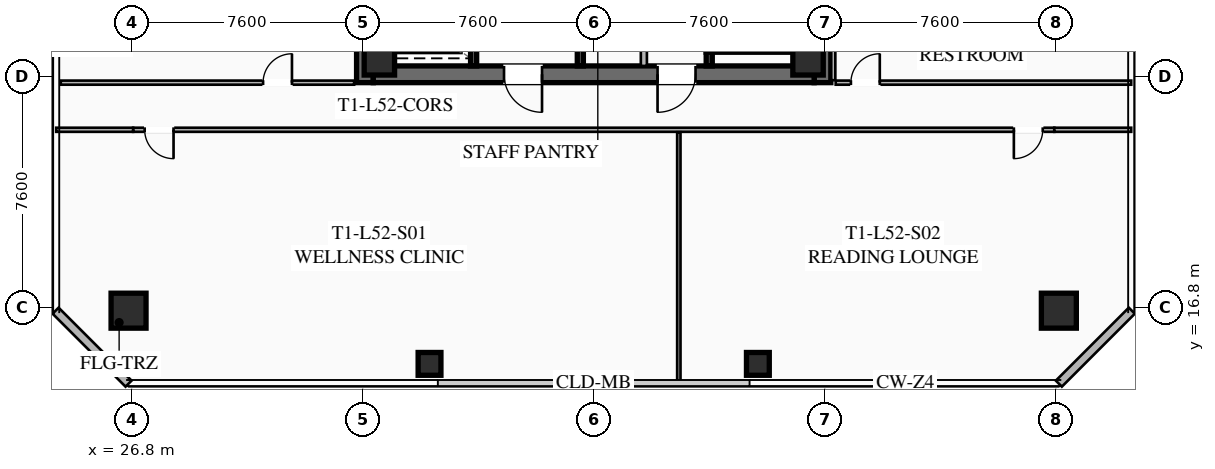
"""IFC4 building model, lengths in metres.
Left out: names, types, materials, properties, quantities, classifications, styles, units other than length and angle.
Written with IfcOpenShell. Run it as: python <this file> out.ifc"""

import sys

from ifc_helpers import new_model, si_unit, direction, frame, frame_2d, origin, origin_2d, place, context, subcontext, project, spatial, rectangle, hollow_rectangle, extrude, element, fill, save


model = new_model("IFC4")
c1 = context("Model", 3, precision=1e-05, world=origin(), true_north=direction((0.0, 1.0)))
c2 = subcontext(c1, "Body", "Model", "MODEL_VIEW")
j1 = project(units=[si_unit("LENGTHUNIT", "METRE"), si_unit("PLANEANGLEUNIT", "RADIAN")], contexts=[c1])
p1 = place(None, origin())
s1 = spatial("IfcSite", under=j1, at=p1, CompositionType="ELEMENT")
p2 = place(p1, origin())
s2 = spatial("IfcBuilding", under=s1, at=p2, CompositionType="ELEMENT")
p3 = place(p2, frame((0.0, 0.0, 192.5)))
s3 = spatial("IfcBuildingStorey", under=s2, at=p3, CompositionType="ELEMENT", Elevation=192.5)
for number, where, z_axis, x_axis in (
    (1, (34.475, 24.2, 0.0), (0.0, 0.0, 1.0), (0.0, 1.0, 0.0)),
    (2, (49.525, 39.8, 0.0), (0.0, 0.0, 1.0), (0.0, -1.0, 0.0)),
):
    element("IfcWall", number, at=place(p3, frame(where, z_axis=z_axis, x_axis=x_axis)), inside=s3, PredefinedType="SHEAR", context=c2, shape_type="SweptSolid", body=[
        extrude(rectangle(XDim=15.6, YDim=0.55, at=frame_2d((7.8, 0.0))), origin(), (0.0, 0.0, 1.0), 3.55),
    ])
p4 = place(p3, frame((49.25, 24.475, 0.0), z_axis=(0.0, 0.0, 1.0), x_axis=(-1.0, 0.0, 0.0)))
e3 = element("IfcWall", 3, at=p4, inside=s3, PredefinedType="SHEAR", context=c2, shape_type="SweptSolid", body=[
    extrude(rectangle(XDim=14.5, YDim=0.55, at=frame_2d((7.25, 0.0))), origin(), (0.0, 0.0, 1.0), 3.55),
])
p5 = place(p4, frame((8.95, 0.0, 0.0)))
e4 = element("IfcOpeningElement", 4, at=p5, cuts=e3, PredefinedType="OPENING", context=c2, shape_type="SweptSolid", body=[
    extrude(rectangle(XDim=1.25, YDim=2.25, at=frame_2d((0.625, 1.125))), frame((0.0, 0.285, 0.0), z_axis=(0.0, -1.0, 0.0), x_axis=(1.0, 0.0, 0.0)), (0.0, 0.0, 1.0), 0.57),
])
p6 = place(p4, frame((3.9, 0.0, 0.0)))
e5 = element("IfcOpeningElement", 5, at=p6, cuts=e3, PredefinedType="OPENING", context=c2, shape_type="SweptSolid", body=[
    extrude(rectangle(XDim=1.25, YDim=2.25, at=frame_2d((0.625, 1.125))), frame((0.0, 0.285, 0.0), z_axis=(0.0, -1.0, 0.0), x_axis=(1.0, 0.0, 0.0)), (0.0, 0.0, 1.0), 0.57),
])
for number, where, z_axis, x_axis in (
    (6, (34.95, 24.95, 0.0), (0.0, 0.0, 1.0), (1.0, 0.0, 0.0)),
    (7, (49.05, 24.95, 0.0), (0.0, 0.0, 1.0), (1.0, 0.0, 0.0)),
):
    element("IfcColumn", number, at=place(p3, frame(where, z_axis=z_axis, x_axis=x_axis)), inside=s3, PredefinedType="COLUMN", context=c2, shape_type="SweptSolid", body=[
        extrude(hollow_rectangle(XDim=1.0, YDim=1.0, WallThickness=0.04, at=origin_2d()), origin(), (0.0, 0.0, 1.0), 3.37),
    ])
for number, where, z_axis, x_axis in (
    (8, (26.7, 16.7, 0.0), (0.0, 0.0, 1.0), (1.0, 0.0, 0.0)),
    (9, (57.3, 16.7, 0.0), (0.0, 0.0, 1.0), (1.0, 0.0, 0.0)),
):
    element("IfcColumn", number, at=place(p3, frame(where, z_axis=z_axis, x_axis=x_axis)), inside=s3, PredefinedType="COLUMN", context=c2, shape_type="SweptSolid", body=[
        extrude(hollow_rectangle(XDim=1.15, YDim=1.15, WallThickness=0.045, at=origin_2d()), origin(), (0.0, 0.0, 1.0), 3.37),
    ])
for number, where, z_axis, x_axis in (
    (10, (36.6, 14.95, 0.0), (0.0, 0.0, 1.0), (1.0, 0.0, 0.0)),
    (11, (47.4, 14.95, 0.0), (0.0, 0.0, 1.0), (1.0, 0.0, 0.0)),
):
    element("IfcColumn", number, at=place(p3, frame(where, z_axis=z_axis, x_axis=x_axis)), inside=s3, PredefinedType="COLUMN", context=c2, shape_type="SweptSolid", body=[
        extrude(hollow_rectangle(XDim=0.75, YDim=0.75, WallThickness=0.032, at=origin_2d()), origin(), (0.0, 0.0, 1.0), 3.37),
    ])
for number, where, z_axis, x_axis in (
    (12, (26.7, 14.3, 0.0), (0.0, 0.0, 1.0), (-0.707, 0.707, 0.0)),
    (13, (59.7, 16.7, 0.0), (0.0, 0.0, 1.0), (-0.707, -0.707, 0.0)),
):
    element("IfcWall", number, at=place(p3, frame(where, z_axis=z_axis, x_axis=x_axis)), inside=s3, PredefinedType="SOLIDWALL", context=c2, shape_type="SweptSolid", body=[
        extrude(rectangle(XDim=3.394, YDim=0.28, at=frame_2d((1.697, 0.0))), origin(), (0.0, 0.0, 1.0), 3.37),
    ])
p7 = place(p3, frame((45.8, 32.8, 0.0), z_axis=(0.0, 0.0, 1.0), x_axis=(0.0, -1.0, 0.0)))
e14 = element("IfcWall", 14, at=p7, inside=s3, PredefinedType="SHEAR", context=c2, shape_type="SweptSolid", body=[
    extrude(rectangle(XDim=8.05, YDim=0.2, at=frame_2d((4.025, 0.0))), origin(), (0.0, 0.0, 1.0), 3.37),
])
p8 = place(p7, frame((0.45, 0.0, 0.0)))
e15 = element("IfcOpeningElement", 15, at=p8, cuts=e14, PredefinedType="OPENING", context=c2, shape_type="SweptSolid", body=[
    extrude(rectangle(XDim=1.15, YDim=2.2, at=frame_2d((0.575, 1.1))), frame((0.0, 0.11, 0.0), z_axis=(0.0, -1.0, 0.0), x_axis=(1.0, 0.0, 0.0)), (0.0, 0.0, 1.0), 0.22),
])
p9 = place(p3, frame((41.56, 24.75, 0.0), z_axis=(0.0, 0.0, 1.0), x_axis=(0.0, 1.0, 0.0)))
e16 = element("IfcWall", 16, at=p9, inside=s3, PredefinedType="SHEAR", context=c2, shape_type="SweptSolid", body=[
    extrude(rectangle(XDim=14.5, YDim=0.2, at=frame_2d((7.25, 0.0))), origin(), (0.0, 0.0, 1.0), 3.37),
])
p10 = place(p3, frame((38.05, 24.75, 0.0), z_axis=(0.0, 0.0, 1.0), x_axis=(0.0, 1.0, 0.0)))
e17 = element("IfcWall", 17, at=p10, inside=s3, PredefinedType="SHEAR", context=c2, shape_type="SweptSolid", body=[
    extrude(rectangle(XDim=6.45, YDim=0.2, at=frame_2d((3.225, 0.0))), origin(), (0.0, 0.0, 1.0), 3.37),
])
p11 = place(p10, frame((4.875, 0.0, 0.0)))
e18 = element("IfcOpeningElement", 18, at=p11, cuts=e17, PredefinedType="OPENING", context=c2, shape_type="SweptSolid", body=[
    extrude(rectangle(XDim=1.3, YDim=2.25, at=frame_2d((0.65, 1.125))), frame((0.0, 0.11, 0.0), z_axis=(0.0, -1.0, 0.0), x_axis=(1.0, 0.0, 0.0)), (0.0, 0.0, 1.0), 0.22),
])
p12 = place(p10, frame((2.875, 0.0, 0.0)))
e19 = element("IfcOpeningElement", 19, at=p12, cuts=e17, PredefinedType="OPENING", context=c2, shape_type="SweptSolid", body=[
    extrude(rectangle(XDim=1.3, YDim=2.25, at=frame_2d((0.65, 1.125))), frame((0.0, 0.11, 0.0), z_axis=(0.0, -1.0, 0.0), x_axis=(1.0, 0.0, 0.0)), (0.0, 0.0, 1.0), 0.22),
])
p13 = place(p10, frame((0.675, 0.0, 0.0)))
e20 = element("IfcOpeningElement", 20, at=p13, cuts=e17, PredefinedType="OPENING", context=c2, shape_type="SweptSolid", body=[
    extrude(rectangle(XDim=1.3, YDim=2.25, at=frame_2d((0.65, 1.125))), frame((0.0, 0.11, 0.0), z_axis=(0.0, -1.0, 0.0), x_axis=(1.0, 0.0, 0.0)), (0.0, 0.0, 1.0), 0.22),
])
p14 = place(p3, frame((43.65, 24.75, 0.0), z_axis=(0.0, 0.0, 1.0), x_axis=(0.0, 1.0, 0.0)))
e21 = element("IfcWall", 21, at=p14, inside=s3, PredefinedType="SOLIDWALL", context=c2, shape_type="SweptSolid", body=[
    extrude(rectangle(XDim=6.9, YDim=0.2, at=frame_2d((3.45, 0.0))), origin(), (0.0, 0.0, 1.0), 2.723),
])
p15 = place(p14, frame((0.85, 0.0, 0.0)))
e22 = element("IfcOpeningElement", 22, at=p15, cuts=e21, PredefinedType="OPENING", context=c2, shape_type="SweptSolid", body=[
    extrude(rectangle(XDim=0.95, YDim=2.05, at=frame_2d((0.475, 1.025))), frame((0.0, 0.11, 0.0), z_axis=(0.0, -1.0, 0.0), x_axis=(1.0, 0.0, 0.0)), (0.0, 0.0, 1.0), 0.22),
])
p16 = place(p14, frame((4.8, 0.0, 0.0)))
e23 = element("IfcOpeningElement", 23, at=p16, cuts=e21, PredefinedType="OPENING", context=c2, shape_type="SweptSolid", body=[
    extrude(rectangle(XDim=1.05, YDim=2.2, at=frame_2d((0.525, 1.1))), frame((0.0, 0.11, 0.0), z_axis=(0.0, -1.0, 0.0), x_axis=(1.0, 0.0, 0.0)), (0.0, 0.0, 1.0), 0.22),
])
p17 = place(p3, frame((57.15, 22.65, 0.0), z_axis=(0.0, 0.0, 1.0), x_axis=(-1.0, 0.0, 0.0)))
e24 = element("IfcWall", 24, at=p17, inside=s3, PredefinedType="PARTITIONING", context=c2, shape_type="SweptSolid", body=[
    extrude(rectangle(XDim=30.3, YDim=0.135, at=frame_2d((15.15, 0.0))), origin(), (0.0, 0.0, 1.0), 2.723),
])
p18 = place(p17, frame((28.97, 0.0, 0.0)))
e25 = element("IfcOpeningElement", 25, at=p18, cuts=e24, PredefinedType="OPENING", context=c2, shape_type="SweptSolid", body=[
    extrude(rectangle(XDim=0.95, YDim=2.05, at=frame_2d((0.475, 1.025))), frame((0.0, 0.077, 0.0), z_axis=(0.0, -1.0, 0.0), x_axis=(1.0, 0.0, 0.0)), (0.0, 0.0, 1.0), 0.155),
])
p19 = place(p17, frame((0.38, 0.0, 0.0)))
e26 = element("IfcOpeningElement", 26, at=p19, cuts=e24, PredefinedType="OPENING", context=c2, shape_type="SweptSolid", body=[
    extrude(rectangle(XDim=0.95, YDim=2.05, at=frame_2d((0.475, 1.025))), frame((0.0, 0.077, 0.0), z_axis=(0.0, -1.0, 0.0), x_axis=(1.0, 0.0, 0.0)), (0.0, 0.0, 1.0), 0.155),
])
for number, where, z_axis, x_axis in (
    (27, (24.32, 22.65, 0.0), (0.0, 0.0, 1.0), (1.0, 0.0, 0.0)),
    (28, (57.15, 22.65, 0.0), (0.0, 0.0, 1.0), (1.0, 0.0, 0.0)),
):
    element("IfcWall", number, at=place(p3, frame(where, z_axis=z_axis, x_axis=x_axis)), inside=s3, PredefinedType="PARTITIONING", context=c2, shape_type="SweptSolid", body=[
        extrude(rectangle(XDim=2.53, YDim=0.135, at=frame_2d((1.265, 0.0))), origin(), (0.0, 0.0, 1.0), 2.723),
    ])
p20 = place(p3, frame((44.8, 14.32, 0.0), z_axis=(0.0, 0.0, 1.0), x_axis=(0.0, 1.0, 0.0)))
e29 = element("IfcWall", 29, at=p20, inside=s3, PredefinedType="PARTITIONING", context=c2, shape_type="SweptSolid", body=[
    extrude(rectangle(XDim=8.25, YDim=0.11, at=frame_2d((4.125, 0.0))), origin(), (0.0, 0.0, 1.0), 2.723),
])
p21 = place(p3, frame((49.88, 39.72, 0.0), z_axis=(0.0, 0.0, 1.0), x_axis=(0.0, -1.0, 0.0)))
e30 = element("IfcWall", 30, at=p21, inside=s3, PredefinedType="PARTITIONING", context=c2, shape_type="SweptSolid", body=[
    extrude(rectangle(XDim=15.44, YDim=0.135, at=frame_2d((7.72, 0.0))), origin(), (0.0, 0.0, 1.0), 2.723),
])
p22 = place(p3, frame((49.96, 24.2, 0.0), z_axis=(0.0, 0.0, 1.0), x_axis=(1.0, 0.0, 0.0)))
e31 = element("IfcWall", 31, at=p22, inside=s3, PredefinedType="PARTITIONING", context=c2, shape_type="SweptSolid", body=[
    extrude(rectangle(XDim=9.72, YDim=0.135, at=frame_2d((4.86, 0.0))), origin(), (0.0, 0.0, 1.0), 2.723),
])
p23 = place(p22, frame((0.5, 0.0, 0.0)))
e32 = element("IfcOpeningElement", 32, at=p23, cuts=e31, PredefinedType="OPENING", context=c2, shape_type="SweptSolid", body=[
    extrude(rectangle(XDim=0.95, YDim=2.05, at=frame_2d((0.475, 1.025))), frame((0.0, 0.077, 0.0), z_axis=(0.0, -1.0, 0.0), x_axis=(1.0, 0.0, 0.0)), (0.0, 0.0, 1.0), 0.155),
])
p24 = place(p3, frame((24.47, 24.2, 0.0), z_axis=(0.0, 0.0, 1.0), x_axis=(1.0, 0.0, 0.0)))
e33 = element("IfcWall", 33, at=p24, inside=s3, PredefinedType="PARTITIONING", context=c2, shape_type="SweptSolid", body=[
    extrude(rectangle(XDim=9.65, YDim=0.135, at=frame_2d((4.825, 0.0))), origin(), (0.0, 0.0, 1.0), 2.723),
])
p25 = place(p24, frame((6.655, 0.0, 0.0)))
e34 = element("IfcOpeningElement", 34, at=p25, cuts=e33, PredefinedType="OPENING", context=c2, shape_type="SweptSolid", body=[
    extrude(rectangle(XDim=0.95, YDim=2.05, at=frame_2d((0.475, 1.025))), frame((0.0, 0.077, 0.0), z_axis=(0.0, -1.0, 0.0), x_axis=(1.0, 0.0, 0.0)), (0.0, 0.0, 1.0), 0.155),
])
p26 = place(p5, origin())
e35 = element("IfcDoor", 35, at=p26, inside=s3, OperationType="SINGLE_SWING_LEFT", PredefinedType="DOOR", context=c2, shape_type="SweptSolid", body=[
    extrude(rectangle(XDim=1.25, YDim=2.25, at=frame_2d((0.625, 1.125))), frame((0.0, 0.025, 0.0), z_axis=(0.0, -1.0, 0.0), x_axis=(1.0, 0.0, 0.0)), (0.0, 0.0, 1.0), 0.05),
])
fill(e4, e35)
p27 = place(p6, origin())
e36 = element("IfcDoor", 36, at=p27, inside=s3, OperationType="SINGLE_SWING_RIGHT", PredefinedType="DOOR", context=c2, shape_type="SweptSolid", body=[
    extrude(rectangle(XDim=1.25, YDim=2.25, at=frame_2d((0.625, 1.125))), frame((0.0, 0.025, 0.0), z_axis=(0.0, -1.0, 0.0), x_axis=(1.0, 0.0, 0.0)), (0.0, 0.0, 1.0), 0.05),
])
fill(e5, e36)
p28 = place(p18, origin())
e37 = element("IfcDoor", 37, at=p28, inside=s3, OperationType="SINGLE_SWING_LEFT", PredefinedType="DOOR", context=c2, shape_type="SweptSolid", body=[
    extrude(rectangle(XDim=0.95, YDim=2.05, at=frame_2d((0.475, 1.025))), frame((0.0, 0.025, 0.0), z_axis=(0.0, -1.0, 0.0), x_axis=(1.0, 0.0, 0.0)), (0.0, 0.0, 1.0), 0.05),
])
fill(e25, e37)
p29 = place(p19, origin())
e38 = element("IfcDoor", 38, at=p29, inside=s3, OperationType="SINGLE_SWING_RIGHT", PredefinedType="DOOR", context=c2, shape_type="SweptSolid", body=[
    extrude(rectangle(XDim=0.95, YDim=2.05, at=frame_2d((0.475, 1.025))), frame((0.0, 0.025, 0.0), z_axis=(0.0, -1.0, 0.0), x_axis=(1.0, 0.0, 0.0)), (0.0, 0.0, 1.0), 0.05),
])
fill(e26, e38)
p30 = place(p23, origin())
e39 = element("IfcDoor", 39, at=p30, inside=s3, OperationType="SINGLE_SWING_RIGHT", PredefinedType="DOOR", context=c2, shape_type="SweptSolid", body=[
    extrude(rectangle(XDim=0.95, YDim=2.05, at=frame_2d((0.475, 1.025))), frame((0.0, 0.025, 0.0), z_axis=(0.0, -1.0, 0.0), x_axis=(1.0, 0.0, 0.0)), (0.0, 0.0, 1.0), 0.05),
])
fill(e32, e39)
p31 = place(p25, origin())
e40 = element("IfcDoor", 40, at=p31, inside=s3, OperationType="SINGLE_SWING_RIGHT", PredefinedType="DOOR", context=c2, shape_type="SweptSolid", body=[
    extrude(rectangle(XDim=0.95, YDim=2.05, at=frame_2d((0.475, 1.025))), frame((0.0, 0.025, 0.0), z_axis=(0.0, -1.0, 0.0), x_axis=(1.0, 0.0, 0.0)), (0.0, 0.0, 1.0), 0.05),
])
fill(e34, e40)
save(model, sys.argv[1])
